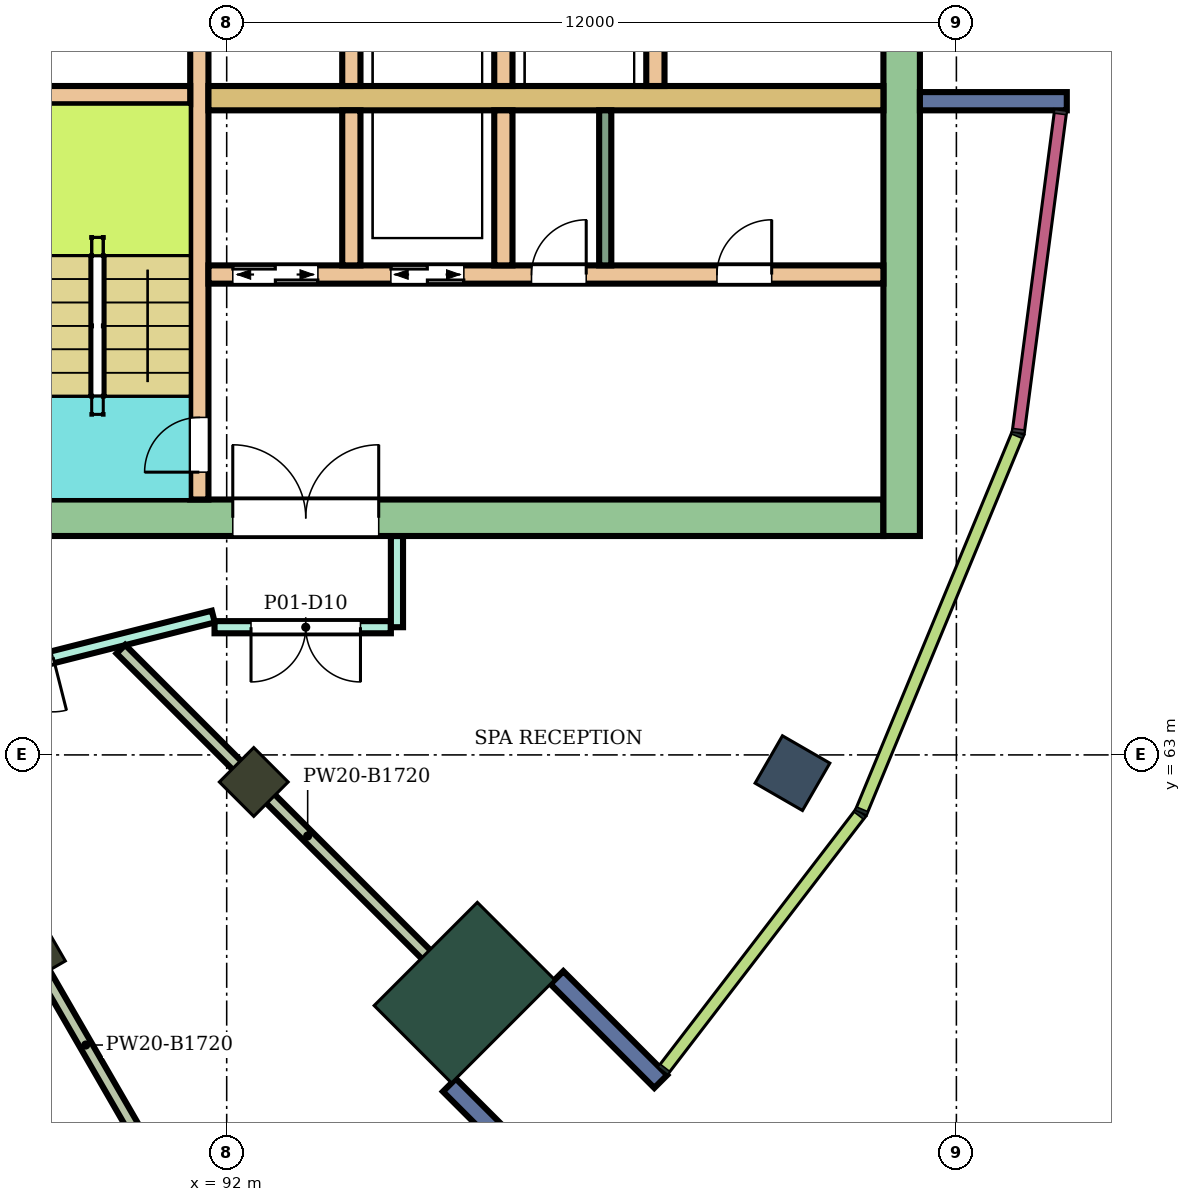
"""IFC4 building model, lengths in metres.
Left out: names, types, materials, properties, quantities, classifications, styles, units other than length and angle.
Written with IfcOpenShell. Run it as: python <this file> out.ifc"""

import sys

from ifc_helpers import new_model, si_unit, direction, frame, frame_2d, origin, origin_2d, place, context, subcontext, project, spatial, rectangle, extrude, element, fill, save


model = new_model("IFC4")
c1 = context("Model", 3, precision=1e-05, world=origin(), true_north=direction((0.0, 1.0)))
c2 = subcontext(c1, "Body", "Model", "MODEL_VIEW")
j1 = project(units=[si_unit("LENGTHUNIT", "METRE"), si_unit("PLANEANGLEUNIT", "RADIAN")], contexts=[c1])
p1 = place(None, origin())
s1 = spatial("IfcSite", under=j1, at=p1, CompositionType="ELEMENT")
p2 = place(p1, origin())
s2 = spatial("IfcBuilding", under=s1, at=p2, CompositionType="ELEMENT")
p3 = place(p2, frame((0.0, 0.0, 270.9)))
s3 = spatial("IfcBuildingStorey", under=s2, at=p3, CompositionType="ELEMENT", Elevation=270.9)
p4 = place(p3, frame((101.304, 62.7, 0.0), z_axis=(0.0, 0.0, 1.0), x_axis=(0.866025403784, -0.5, 0.0)))
e1 = element("IfcColumn", 1, at=p4, inside=s3, PredefinedType="COLUMN", context=c2, shape_type="SweptSolid", body=[
    extrude(rectangle(XDim=0.9, YDim=0.9, at=origin_2d()), origin(), (0.0, 0.0, 1.0), 4.8),
])
for number, where, z_axis, x_axis in (
    (2, (88.8, 59.758, 0.0), (0.0, 0.0, 1.0), (0.5, -0.866, 0.0)),
    (3, (92.445, 62.555, 0.0), (0.0, 0.0, 1.0), (0.707, -0.707, 0.0)),
):
    element("IfcColumn", number, at=place(p3, frame(where, z_axis=z_axis, x_axis=x_axis)), inside=s3, PredefinedType="COLUMN", context=c2, shape_type="SweptSolid", body=[
        extrude(rectangle(XDim=0.8, YDim=0.8, at=origin_2d()), origin(), (0.0, 0.0, 1.0), 4.8),
    ])
p5 = place(p3, frame((95.91, 59.09, 0.0), z_axis=(0.0, 0.0, 1.0), x_axis=(0.707106781187, -0.707106781187, 0.0)))
e4 = element("IfcColumn", 4, at=p5, inside=s3, PredefinedType="COLUMN", context=c2, shape_type="SweptSolid", body=[
    extrude(rectangle(XDim=1.8, YDim=2.4, at=origin_2d()), origin(), (0.0, 0.0, 1.0), 4.8),
])
p6 = place(p3, frame((87.9, 66.9, 0.0), z_axis=(0.0, 0.0, 1.0), x_axis=(1.0, 0.0, 0.0)))
e5 = element("IfcWall", 5, at=p6, inside=s3, PredefinedType="SHEAR", context=c2, shape_type="SweptSolid", body=[
    extrude(rectangle(XDim=14.9, YDim=0.6, at=frame_2d((7.45, 0.0))), origin(), (0.0, 0.0, 1.0), 4.48),
])
p7 = place(p6, frame((4.2, 0.0, 0.0)))
e6 = element("IfcOpeningElement", 6, at=p7, cuts=e5, PredefinedType="OPENING", context=c2, shape_type="SweptSolid", body=[
    extrude(rectangle(XDim=2.4, YDim=2.4, at=frame_2d((1.2, 1.2))), frame((0.0, 0.31, 0.0), z_axis=(0.0, -1.0, 0.0), x_axis=(1.0, 0.0, 0.0)), (0.0, 0.0, 1.0), 0.62),
])
p8 = place(p3, frame((103.1, 66.6, 0.0), z_axis=(0.0, 0.0, 1.0), x_axis=(0.0, 1.0, 0.0)))
e7 = element("IfcWall", 7, at=p8, inside=s3, PredefinedType="SHEAR", context=c2, shape_type="SweptSolid", body=[
    extrude(rectangle(XDim=16.8, YDim=0.6, at=frame_2d((8.4, 0.0))), origin(), (0.0, 0.0, 1.0), 4.48),
])
p9 = place(p3, frame((91.55, 67.2, 0.0), z_axis=(0.0, 0.0, 1.0), x_axis=(0.0, 1.0, 0.0)))
e8 = element("IfcWall", 8, at=p9, inside=s3, PredefinedType="SHEAR", context=c2, shape_type="SweptSolid", body=[
    extrude(rectangle(XDim=7.8, YDim=0.3, at=frame_2d((3.9, 0.0))), origin(), (0.0, 0.0, 1.0), 4.48),
])
p10 = place(p9, frame((0.45, 0.0, 0.0)))
e9 = element("IfcOpeningElement", 9, at=p10, cuts=e8, PredefinedType="OPENING", context=c2, shape_type="SweptSolid", body=[
    extrude(rectangle(XDim=0.9, YDim=2.1, at=frame_2d((0.45, 1.05))), frame((0.0, 0.16, 0.0), z_axis=(0.0, -1.0, 0.0), x_axis=(1.0, 0.0, 0.0)), (0.0, 0.0, 1.0), 0.32),
])
p11 = place(p3, frame((88.35, 73.85, 0.0), z_axis=(0.0, 0.0, 1.0), x_axis=(1.0, 0.0, 0.0)))
e10 = element("IfcWall", 10, at=p11, inside=s3, PredefinedType="SHEAR", context=c2, shape_type="SweptSolid", body=[
    extrude(rectangle(XDim=3.05, YDim=0.3, at=frame_2d((1.525, 0.0))), origin(), (0.0, 0.0, 1.0), 4.48),
])
p12 = place(p3, frame((91.7, 73.8, 0.0), z_axis=(0.0, 0.0, 1.0), x_axis=(1.0, 0.0, 0.0)))
e11 = element("IfcWall", 11, at=p12, inside=s3, PredefinedType="SHEAR", context=c2, shape_type="SweptSolid", body=[
    extrude(rectangle(XDim=11.1, YDim=0.4, at=frame_2d((5.55, 0.0))), origin(), (0.0, 0.0, 1.0), 4.48),
])
p13 = place(p3, frame((91.7, 70.9, 0.0), z_axis=(0.0, 0.0, 1.0), x_axis=(1.0, 0.0, 0.0)))
e12 = element("IfcWall", 12, at=p13, inside=s3, PredefinedType="SHEAR", context=c2, shape_type="SweptSolid", body=[
    extrude(rectangle(XDim=11.1, YDim=0.3, at=frame_2d((5.55, 0.0))), origin(), (0.0, 0.0, 1.0), 4.48),
])
p14 = place(p13, frame((0.4, 0.0, 0.0)))
e13 = element("IfcOpeningElement", 13, at=p14, cuts=e12, PredefinedType="OPENING", context=c2, shape_type="SweptSolid", body=[
    extrude(rectangle(XDim=1.4, YDim=2.1, at=frame_2d((0.7, 1.05))), frame((0.0, 0.16, 0.0), z_axis=(0.0, -1.0, 0.0), x_axis=(1.0, 0.0, 0.0)), (0.0, 0.0, 1.0), 0.32),
])
p15 = place(p13, frame((3.0, 0.0, 0.0)))
e14 = element("IfcOpeningElement", 14, at=p15, cuts=e12, PredefinedType="OPENING", context=c2, shape_type="SweptSolid", body=[
    extrude(rectangle(XDim=1.2, YDim=2.1, at=frame_2d((0.6, 1.05))), frame((0.0, 0.16, 0.0), z_axis=(0.0, -1.0, 0.0), x_axis=(1.0, 0.0, 0.0)), (0.0, 0.0, 1.0), 0.32),
])
p16 = place(p13, frame((5.312, 0.0, 0.0)))
e15 = element("IfcOpeningElement", 15, at=p16, cuts=e12, PredefinedType="OPENING", context=c2, shape_type="SweptSolid", body=[
    extrude(rectangle(XDim=0.9, YDim=2.1, at=frame_2d((0.45, 1.05))), frame((0.0, 0.16, 0.0), z_axis=(0.0, -1.0, 0.0), x_axis=(1.0, 0.0, 0.0)), (0.0, 0.0, 1.0), 0.32),
])
p17 = place(p13, frame((8.363, 0.0, 0.0)))
e16 = element("IfcOpeningElement", 16, at=p17, cuts=e12, PredefinedType="OPENING", context=c2, shape_type="SweptSolid", body=[
    extrude(rectangle(XDim=0.9, YDim=2.1, at=frame_2d((0.45, 1.05))), frame((0.0, 0.16, 0.0), z_axis=(0.0, -1.0, 0.0), x_axis=(1.0, 0.0, 0.0)), (0.0, 0.0, 1.0), 0.32),
])
for number, where, z_axis, x_axis in (
    (17, (94.05, 74.0, 0.0), (0.0, 0.0, 1.0), (0.0, 1.0, 0.0)),
    (18, (96.55, 74.0, 0.0), (0.0, 0.0, 1.0), (0.0, 1.0, 0.0)),
    (19, (99.05, 74.0, 0.0), (0.0, 0.0, 1.0), (0.0, 1.0, 0.0)),
    (20, (94.05, 71.05, 0.0), (0.0, 0.0, 1.0), (0.0, 1.0, 0.0)),
    (21, (96.55, 71.05, 0.0), (0.0, 0.0, 1.0), (0.0, 1.0, 0.0)),
):
    element("IfcWall", number, at=place(p3, frame(where, z_axis=z_axis, x_axis=x_axis)), inside=s3, PredefinedType="SHEAR", context=c2, shape_type="SweptSolid", body=[
        extrude(rectangle(XDim=2.55, YDim=0.3, at=frame_2d((1.275, 0.0))), origin(), (0.0, 0.0, 1.0), 4.48),
    ])
for number, where, z_axis, x_axis in (
    (22, (103.4, 73.75, 0.0), (0.0, 0.0, 1.0), (1.0, 0.0, 0.0)),
    (23, (95.662, 57.57, 0.0), (0.0, 0.0, 1.0), (0.707, -0.707, 0.0)),
    (24, (97.43, 59.338, 0.0), (0.0, 0.0, 1.0), (0.707, -0.707, 0.0)),
):
    element("IfcWall", number, at=place(p3, frame(where, z_axis=z_axis, x_axis=x_axis)), inside=s3, PredefinedType="NOTDEFINED", context=c2, shape_type="SweptSolid", body=[
        extrude(rectangle(XDim=2.416, YDim=0.3, at=frame_2d((1.208, 0.0))), origin(), (0.0, 0.0, 1.0), 4.8),
    ])
p18 = place(p3, frame((86.053, 63.826, 0.0), z_axis=(0.0, 0.0, 1.0), x_axis=(0.969450593176, 0.245286663704, 0.0)))
e25 = element("IfcWall", 25, at=p18, inside=s3, PredefinedType="PARTITIONING", context=c2, shape_type="SweptSolid", body=[
    extrude(rectangle(XDim=5.907, YDim=0.2, at=frame_2d((2.954, 0.0))), origin(), (0.0, 0.0, 1.0), 4.35),
])
p19 = place(p18, frame((1.389, 0.0, 0.0)))
e26 = element("IfcOpeningElement", 26, at=p19, cuts=e25, PredefinedType="OPENING", context=c2, shape_type="SweptSolid", body=[
    extrude(rectangle(XDim=1.8, YDim=2.1, at=frame_2d((0.9, 1.05))), frame((0.0, 0.11, 0.0), z_axis=(0.0, -1.0, 0.0), x_axis=(1.0, 0.0, 0.0)), (0.0, 0.0, 1.0), 0.22),
])
p20 = place(p3, frame((86.466, 63.8, 0.0), z_axis=(0.0, 0.0, 1.0), x_axis=(0.499941480581, -0.866059187351, 0.0)))
e27 = element("IfcWall", 27, at=p20, inside=s3, PredefinedType="PARTITIONING", context=c2, shape_type="SweptSolid", body=[
    extrude(rectangle(XDim=12.865, YDim=0.2, at=frame_2d((6.433, 0.0))), origin(), (0.0, 0.0, 1.0), 3.08),
])
p21 = place(p3, frame((90.26, 64.739, 0.0), z_axis=(0.0, 0.0, 1.0), x_axis=(0.707050588015, -0.707162969893, 0.0)))
e28 = element("IfcWall", 28, at=p21, inside=s3, PredefinedType="PARTITIONING", context=c2, shape_type="SweptSolid", body=[
    extrude(rectangle(XDim=8.69, YDim=0.2, at=frame_2d((4.345, 0.0))), origin(), (0.0, 0.0, 1.0), 3.08),
])
p22 = place(p3, frame((91.8, 65.1, 0.0), z_axis=(0.0, 0.0, 1.0), x_axis=(1.0, 0.0, 0.0)))
e29 = element("IfcWall", 29, at=p22, inside=s3, PredefinedType="PARTITIONING", context=c2, shape_type="SweptSolid", body=[
    extrude(rectangle(XDim=2.9, YDim=0.2, at=frame_2d((1.45, 0.0))), origin(), (0.0, 0.0, 1.0), 4.35),
])
p23 = place(p22, frame((0.6, 0.0, 0.0)))
e30 = element("IfcOpeningElement", 30, at=p23, cuts=e29, PredefinedType="OPENING", context=c2, shape_type="SweptSolid", body=[
    extrude(rectangle(XDim=1.8, YDim=2.1, at=frame_2d((0.9, 1.05))), frame((0.0, 0.11, 0.0), z_axis=(0.0, -1.0, 0.0), x_axis=(1.0, 0.0, 0.0)), (0.0, 0.0, 1.0), 0.22),
])
p24 = place(p3, frame((94.8, 65.1, 0.0), z_axis=(0.0, 0.0, 1.0), x_axis=(0.0, 1.0, 0.0)))
e31 = element("IfcWall", 31, at=p24, inside=s3, PredefinedType="PARTITIONING", context=c2, shape_type="SweptSolid", body=[
    extrude(rectangle(XDim=1.499, YDim=0.2, at=frame_2d((0.75, 0.0))), origin(), (0.0, 0.0, 1.0), 4.35),
])
p25 = place(p3, frame((98.225, 71.05, 0.0), z_axis=(0.0, 0.0, 1.0), x_axis=(0.0, 1.0, 0.0)))
e32 = element("IfcWall", 32, at=p25, inside=s3, PredefinedType="PARTITIONING", context=c2, shape_type="SweptSolid", body=[
    extrude(rectangle(XDim=2.55, YDim=0.2, at=frame_2d((1.275, 0.0))), origin(), (0.0, 0.0, 1.0), 4.48),
])
p26 = place(p23, frame((1.8, 0.0, 0.0), z_axis=(0.0, 0.0, 1.0), x_axis=(-1.0, 0.0, 0.0)))
e33 = element("IfcDoor", 33, at=p26, inside=s3, OperationType="DOUBLE_DOOR_SINGLE_SWING", PredefinedType="DOOR", context=c2, shape_type="SweptSolid", body=[
    extrude(rectangle(XDim=1.8, YDim=2.1, at=frame_2d((0.9, 1.05))), frame((0.0, 0.025, 0.0), z_axis=(0.0, -1.0, 0.0), x_axis=(1.0, 0.0, 0.0)), (0.0, 0.0, 1.0), 0.05),
])
fill(e30, e33)
p27 = place(p19, frame((1.8, 0.0, 0.0), z_axis=(0.0, 0.0, 1.0), x_axis=(-1.0, 0.0, 0.0)))
e34 = element("IfcDoor", 34, at=p27, inside=s3, OperationType="DOUBLE_DOOR_SINGLE_SWING", PredefinedType="DOOR", context=c2, shape_type="SweptSolid", body=[
    extrude(rectangle(XDim=1.8, YDim=2.1, at=frame_2d((0.9, 1.05))), frame((0.0, 0.025, 0.0), z_axis=(0.0, -1.0, 0.0), x_axis=(1.0, 0.0, 0.0)), (0.0, 0.0, 1.0), 0.05),
])
fill(e26, e34)
p28 = place(p10, origin())
e35 = element("IfcDoor", 35, at=p28, inside=s3, OperationType="SINGLE_SWING_LEFT", PredefinedType="DOOR", context=c2, shape_type="SweptSolid", body=[
    extrude(rectangle(XDim=0.9, YDim=2.1, at=frame_2d((0.45, 1.05))), frame((0.0, 0.025, 0.0), z_axis=(0.0, -1.0, 0.0), x_axis=(1.0, 0.0, 0.0)), (0.0, 0.0, 1.0), 0.05),
])
fill(e9, e35)
p29 = place(p14, origin())
e36 = element("IfcDoor", 36, at=p29, inside=s3, OperationType="DOUBLE_DOOR_SLIDING", PredefinedType="DOOR", context=c2, shape_type="SweptSolid", body=[
    extrude(rectangle(XDim=1.4, YDim=2.1, at=frame_2d((0.7, 1.05))), frame((0.0, 0.025, 0.0), z_axis=(0.0, -1.0, 0.0), x_axis=(1.0, 0.0, 0.0)), (0.0, 0.0, 1.0), 0.05),
])
fill(e13, e36)
p30 = place(p15, origin())
e37 = element("IfcDoor", 37, at=p30, inside=s3, OperationType="DOUBLE_DOOR_SLIDING", PredefinedType="DOOR", context=c2, shape_type="SweptSolid", body=[
    extrude(rectangle(XDim=1.2, YDim=2.1, at=frame_2d((0.6, 1.05))), frame((0.0, 0.025, 0.0), z_axis=(0.0, -1.0, 0.0), x_axis=(1.0, 0.0, 0.0)), (0.0, 0.0, 1.0), 0.05),
])
fill(e14, e37)
p31 = place(p16, origin())
e38 = element("IfcDoor", 38, at=p31, inside=s3, OperationType="SINGLE_SWING_RIGHT", PredefinedType="DOOR", context=c2, shape_type="SweptSolid", body=[
    extrude(rectangle(XDim=0.9, YDim=2.1, at=frame_2d((0.45, 1.05))), frame((0.0, 0.025, 0.0), z_axis=(0.0, -1.0, 0.0), x_axis=(1.0, 0.0, 0.0)), (0.0, 0.0, 1.0), 0.05),
])
fill(e15, e38)
p32 = place(p17, origin())
e39 = element("IfcDoor", 39, at=p32, inside=s3, OperationType="SINGLE_SWING_RIGHT", PredefinedType="DOOR", context=c2, shape_type="SweptSolid", body=[
    extrude(rectangle(XDim=0.9, YDim=2.1, at=frame_2d((0.45, 1.05))), frame((0.0, 0.025, 0.0), z_axis=(0.0, -1.0, 0.0), x_axis=(1.0, 0.0, 0.0)), (0.0, 0.0, 1.0), 0.05),
])
fill(e16, e39)
p33 = place(p7, origin())
e40 = element("IfcDoor", 40, at=p33, inside=s3, OperationType="DOUBLE_DOOR_SINGLE_SWING", PredefinedType="DOOR", context=c2, shape_type="SweptSolid", body=[
    extrude(rectangle(XDim=2.4, YDim=2.4, at=frame_2d((1.2, 1.2))), frame((0.0, 0.025, 0.0), z_axis=(0.0, -1.0, 0.0), x_axis=(1.0, 0.0, 0.0)), (0.0, 0.0, 1.0), 0.05),
])
fill(e6, e40)
save(model, sys.argv[1])
